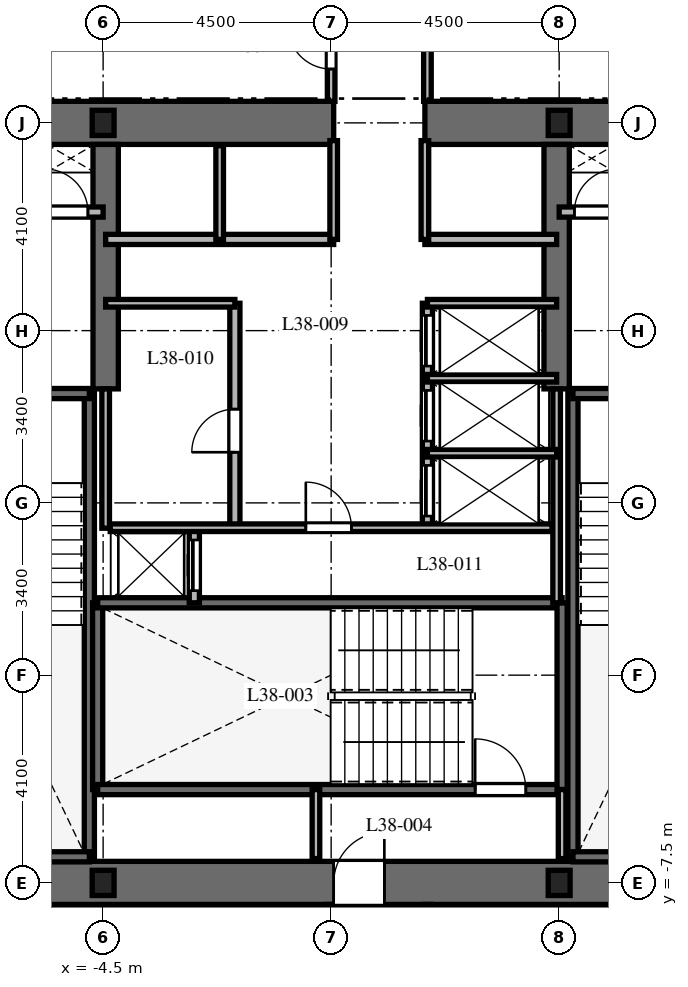
"""IFC4 building model, lengths in metres.
Left out: names, types, materials, properties, quantities, classifications, styles, units other than length and angle.
Written with IfcOpenShell. Run it as: python <this file> out.ifc"""

import sys

from ifc_helpers import new_model, si_unit, direction, frame, frame_2d, origin, origin_2d, place, context, subcontext, project, spatial, rectangle, i_section, extrude, element, fill, save


model = new_model("IFC4")
c1 = context("Model", 3, precision=1e-05, world=origin(), true_north=direction((0.0, 1.0)))
c2 = subcontext(c1, "Body", "Model", "MODEL_VIEW")
j1 = project(units=[si_unit("LENGTHUNIT", "METRE"), si_unit("PLANEANGLEUNIT", "RADIAN")], contexts=[c1])
p1 = place(None, origin())
s1 = spatial("IfcSite", under=j1, at=p1, CompositionType="ELEMENT")
p2 = place(p1, origin())
s2 = spatial("IfcBuilding", under=s1, at=p2, CompositionType="ELEMENT")
p3 = place(p2, frame((0.0, 0.0, 155.4)))
s3 = spatial("IfcBuildingStorey", under=s2, at=p3, CompositionType="ELEMENT", Elevation=155.4)
p4 = place(p3, frame((-9.425, -7.5, 0.0), z_axis=(0.0, 0.0, 1.0), x_axis=(1.0, 0.0, 0.0)))
e1 = element("IfcWall", 1, at=p4, inside=s3, PredefinedType="SHEAR", context=c2, shape_type="SweptSolid", body=[
    extrude(rectangle(XDim=18.85, YDim=0.85, at=frame_2d((9.425, 0.0))), origin(), (0.0, 0.0, 1.0), 3.7),
])
p5 = place(p4, frame((9.475, 0.0, 0.0)))
e2 = element("IfcOpeningElement", 2, at=p5, cuts=e1, PredefinedType="OPENING", context=c2, shape_type="SweptSolid", body=[
    extrude(rectangle(XDim=1.0, YDim=2.15, at=frame_2d((0.5, 1.075))), frame((0.0, 0.435, 0.0), z_axis=(0.0, -1.0, 0.0), x_axis=(1.0, 0.0, 0.0)), (0.0, 0.0, 1.0), 0.87),
])
p6 = place(p3, frame((-9.425, 7.5, 0.0), z_axis=(0.0, 0.0, 1.0), x_axis=(1.0, 0.0, 0.0)))
e3 = element("IfcWall", 3, at=p6, inside=s3, PredefinedType="SHEAR", context=c2, shape_type="SweptSolid", body=[
    extrude(rectangle(XDim=9.475, YDim=0.85, at=frame_2d((4.738, 0.0))), origin(), (0.0, 0.0, 1.0), 3.7),
])
p7 = place(p3, frame((1.85, 7.5, 0.0), z_axis=(0.0, 0.0, 1.0), x_axis=(1.0, 0.0, 0.0)))
e4 = element("IfcWall", 4, at=p7, inside=s3, PredefinedType="SHEAR", context=c2, shape_type="SweptSolid", body=[
    extrude(rectangle(XDim=7.575, YDim=0.85, at=frame_2d((3.788, 0.0))), origin(), (0.0, 0.0, 1.0), 3.7),
])
for number, where, z_axis, x_axis in (
    (5, (-4.45, 2.25, 0.0), (0.0, 0.0, 1.0), (0.0, 1.0, 0.0)),
    (6, (4.45, 2.25, 0.0), (0.0, 0.0, 1.0), (0.0, 1.0, 0.0)),
):
    element("IfcWall", number, at=place(p3, frame(where, z_axis=z_axis, x_axis=x_axis)), inside=s3, PredefinedType="SHEAR", context=c2, shape_type="SweptSolid", body=[
        extrude(rectangle(XDim=4.825, YDim=0.5, at=frame_2d((2.413, 0.0))), origin(), (0.0, 0.0, 1.0), 3.7),
    ])
p8 = place(p3, frame((-4.772, -6.985, 0.0), z_axis=(0.0, 0.0, 1.0), x_axis=(0.0, 1.0, 0.0)))
e7 = element("IfcWall", 7, at=p8, inside=s3, PredefinedType="SHEAR", context=c2, shape_type="SweptSolid", body=[
    extrude(rectangle(XDim=9.143, YDim=0.2, at=frame_2d((4.572, 0.0))), origin(), (0.0, 0.0, 1.0), 3.7),
])
p9 = place(p3, frame((-8.458, -6.985, 0.0), z_axis=(0.0, 0.0, 1.0), x_axis=(1.0, 0.0, 0.0)))
e8 = element("IfcWall", 8, at=p9, inside=s3, PredefinedType="SHEAR", context=c2, shape_type="SweptSolid", body=[
    extrude(rectangle(XDim=3.686, YDim=0.2, at=frame_2d((1.843, 0.0))), origin(), (0.0, 0.0, 1.0), 3.7),
])
p10 = place(p3, frame((-8.458, 2.158, 0.0), z_axis=(0.0, 0.0, 1.0), x_axis=(1.0, 0.0, 0.0)))
e9 = element("IfcWall", 9, at=p10, inside=s3, PredefinedType="SHEAR", context=c2, shape_type="SweptSolid", body=[
    extrude(rectangle(XDim=3.686, YDim=0.2, at=frame_2d((1.843, 0.0))), origin(), (0.0, 0.0, 1.0), 3.7),
])
p11 = place(p10, frame((1.3, 0.0, 0.0)))
e10 = element("IfcOpeningElement", 10, at=p11, cuts=e9, PredefinedType="OPENING", context=c2, shape_type="SweptSolid", body=[
    extrude(rectangle(XDim=1.0, YDim=2.15, at=frame_2d((0.5, 1.075))), frame((0.0, 0.11, 0.0), z_axis=(0.0, -1.0, 0.0), x_axis=(1.0, 0.0, 0.0)), (0.0, 0.0, 1.0), 0.22),
])
p12 = place(p3, frame((4.772, -6.985, 0.0), z_axis=(0.0, 0.0, 1.0), x_axis=(0.0, 1.0, 0.0)))
e11 = element("IfcWall", 11, at=p12, inside=s3, PredefinedType="SHEAR", context=c2, shape_type="SweptSolid", body=[
    extrude(rectangle(XDim=9.143, YDim=0.2, at=frame_2d((4.572, 0.0))), origin(), (0.0, 0.0, 1.0), 3.7),
])
p13 = place(p3, frame((4.772, -6.985, 0.0), z_axis=(0.0, 0.0, 1.0), x_axis=(1.0, 0.0, 0.0)))
e12 = element("IfcWall", 12, at=p13, inside=s3, PredefinedType="SHEAR", context=c2, shape_type="SweptSolid", body=[
    extrude(rectangle(XDim=3.686, YDim=0.2, at=frame_2d((1.843, 0.0))), origin(), (0.0, 0.0, 1.0), 3.7),
])
p14 = place(p3, frame((4.772, 2.158, 0.0), z_axis=(0.0, 0.0, 1.0), x_axis=(1.0, 0.0, 0.0)))
e13 = element("IfcWall", 13, at=p14, inside=s3, PredefinedType="SHEAR", context=c2, shape_type="SweptSolid", body=[
    extrude(rectangle(XDim=3.686, YDim=0.2, at=frame_2d((1.843, 0.0))), origin(), (0.0, 0.0, 1.0), 3.7),
])
p15 = place(p14, frame((1.35, 0.0, 0.0)))
e14 = element("IfcOpeningElement", 14, at=p15, cuts=e13, PredefinedType="OPENING", context=c2, shape_type="SweptSolid", body=[
    extrude(rectangle(XDim=1.0, YDim=2.15, at=frame_2d((0.5, 1.075))), frame((0.0, 0.11, 0.0), z_axis=(0.0, -1.0, 0.0), x_axis=(1.0, 0.0, 0.0)), (0.0, 0.0, 1.0), 0.22),
])
p16 = place(p3, frame((-4.608, -5.658, 0.0), z_axis=(0.0, 0.0, 1.0), x_axis=(0.0, 1.0, 0.0)))
e15 = element("IfcWall", 15, at=p16, inside=s3, PredefinedType="SHEAR", context=c2, shape_type="SweptSolid", body=[
    extrude(rectangle(XDim=3.686, YDim=0.2, at=frame_2d((1.843, 0.0))), origin(), (0.0, 0.0, 1.0), 3.7),
])
p17 = place(p3, frame((-4.608, -5.658, 0.0), z_axis=(0.0, 0.0, 1.0), x_axis=(1.0, 0.0, 0.0)))
e16 = element("IfcWall", 16, at=p17, inside=s3, PredefinedType="SHEAR", context=c2, shape_type="SweptSolid", body=[
    extrude(rectangle(XDim=9.166, YDim=0.2, at=frame_2d((4.583, 0.0))), origin(), (0.0, 0.0, 1.0), 3.7),
])
p18 = place(p17, frame((7.45, 0.0, 0.0)))
e17 = element("IfcOpeningElement", 17, at=p18, cuts=e16, PredefinedType="OPENING", context=c2, shape_type="SweptSolid", body=[
    extrude(rectangle(XDim=1.0, YDim=2.15, at=frame_2d((0.5, 1.075))), frame((0.0, 0.11, 0.0), z_axis=(0.0, -1.0, 0.0), x_axis=(1.0, 0.0, 0.0)), (0.0, 0.0, 1.0), 0.22),
])
p19 = place(p3, frame((-4.608, -1.972, 0.0), z_axis=(0.0, 0.0, 1.0), x_axis=(1.0, 0.0, 0.0)))
e18 = element("IfcWall", 18, at=p19, inside=s3, PredefinedType="SHEAR", context=c2, shape_type="SweptSolid", body=[
    extrude(rectangle(XDim=9.166, YDim=0.2, at=frame_2d((4.583, 0.0))), origin(), (0.0, 0.0, 1.0), 3.7),
])
p20 = place(p3, frame((4.558, -5.658, 0.0), z_axis=(0.0, 0.0, 1.0), x_axis=(0.0, 1.0, 0.0)))
e19 = element("IfcWall", 19, at=p20, inside=s3, PredefinedType="SHEAR", context=c2, shape_type="SweptSolid", body=[
    extrude(rectangle(XDim=3.686, YDim=0.2, at=frame_2d((1.843, 0.0))), origin(), (0.0, 0.0, 1.0), 3.7),
])
for number, where, z_axis, x_axis in (
    (20, (-4.5, -7.5, 0.0), (0.0, 0.0, 1.0), (1.0, 0.0, 0.0)),
    (21, (4.5, -7.5, 0.0), (0.0, 0.0, 1.0), (1.0, 0.0, 0.0)),
    (22, (4.5, 7.5, 0.0), (0.0, 0.0, 1.0), (1.0, 0.0, 0.0)),
    (23, (-4.5, 7.5, 0.0), (0.0, 0.0, 1.0), (1.0, 0.0, 0.0)),
):
    element("IfcColumn", number, at=place(p3, frame(where, z_axis=z_axis, x_axis=x_axis)), inside=s3, PredefinedType="COLUMN", context=c2, shape_type="SweptSolid", body=[
        extrude(i_section(OverallWidth=0.432, OverallDepth=0.498, WebThickness=0.056, FlangeThickness=0.089, at=origin_2d()), origin(), (0.0, 0.0, 1.0), 3.7),
    ])
for number, where, z_axis, x_axis in (
    (24, (-0.3, -7.02, 0.0), (0.0, 0.0, 1.0), (0.0, 1.0, 0.0)),
    (25, (4.558, -7.02, 0.0), (0.0, 0.0, 1.0), (0.0, 1.0, 0.0)),
):
    element("IfcWall", number, at=place(p3, frame(where, z_axis=z_axis, x_axis=x_axis)), inside=s3, PredefinedType="PARTITIONING", context=c2, shape_type="SweptSolid", body=[
        extrude(rectangle(XDim=1.362, YDim=0.15, at=frame_2d((0.681, 0.0))), origin(), (0.0, 0.0, 1.0), 3.4),
    ])
p21 = place(p3, frame((-8.55, 5.74, 0.0), z_axis=(0.0, 0.0, 1.0), x_axis=(1.0, 0.0, 0.0)))
e26 = element("IfcWall", 26, at=p21, inside=s3, PredefinedType="PARTITIONING", context=c2, shape_type="SweptSolid", body=[
    extrude(rectangle(XDim=4.05, YDim=0.2, at=frame_2d((2.025, 0.0))), origin(), (0.0, 0.0, 1.0), 3.4),
])
p22 = place(p21, frame((0.75, 0.0, 0.0)))
e27 = element("IfcOpeningElement", 27, at=p22, cuts=e26, PredefinedType="OPENING", context=c2, shape_type="SweptSolid", body=[
    extrude(rectangle(XDim=1.1, YDim=2.2, at=frame_2d((0.55, 1.1))), frame((0.0, 0.11, 0.0), z_axis=(0.0, -1.0, 0.0), x_axis=(1.0, 0.0, 0.0)), (0.0, 0.0, 1.0), 0.22),
])
p23 = place(p21, frame((2.9, 0.0, 0.0)))
e28 = element("IfcOpeningElement", 28, at=p23, cuts=e26, PredefinedType="OPENING", context=c2, shape_type="SweptSolid", body=[
    extrude(rectangle(XDim=0.85, YDim=2.03, at=frame_2d((0.425, 1.015))), frame((0.0, 0.11, 0.0), z_axis=(0.0, -1.0, 0.0), x_axis=(1.0, 0.0, 0.0)), (0.0, 0.0, 1.0), 0.22),
])
p24 = place(p3, frame((4.5, 5.74, 0.0), z_axis=(0.0, 0.0, 1.0), x_axis=(1.0, 0.0, 0.0)))
e29 = element("IfcWall", 29, at=p24, inside=s3, PredefinedType="PARTITIONING", context=c2, shape_type="SweptSolid", body=[
    extrude(rectangle(XDim=4.05, YDim=0.2, at=frame_2d((2.025, 0.0))), origin(), (0.0, 0.0, 1.0), 3.4),
])
p25 = place(p24, frame((0.3, 0.0, 0.0)))
e30 = element("IfcOpeningElement", 30, at=p25, cuts=e29, PredefinedType="OPENING", context=c2, shape_type="SweptSolid", body=[
    extrude(rectangle(XDim=0.85, YDim=2.03, at=frame_2d((0.425, 1.015))), frame((0.0, 0.11, 0.0), z_axis=(0.0, -1.0, 0.0), x_axis=(1.0, 0.0, 0.0)), (0.0, 0.0, 1.0), 0.22),
])
p26 = place(p24, frame((2.15, 0.0, 0.0)))
e31 = element("IfcOpeningElement", 31, at=p26, cuts=e29, PredefinedType="OPENING", context=c2, shape_type="SweptSolid", body=[
    extrude(rectangle(XDim=1.1, YDim=2.2, at=frame_2d((0.55, 1.1))), frame((0.0, 0.11, 0.0), z_axis=(0.0, -1.0, 0.0), x_axis=(1.0, 0.0, 0.0)), (0.0, 0.0, 1.0), 0.22),
])
p27 = place(p3, frame((-2.7, -1.972, 0.0), z_axis=(0.0, 0.0, 1.0), x_axis=(0.0, 1.0, 0.0)))
e32 = element("IfcWall", 32, at=p27, inside=s3, PredefinedType="PARTITIONING", context=c2, shape_type="SweptSolid", body=[
    extrude(rectangle(XDim=1.472, YDim=0.2, at=frame_2d((0.736, 0.0))), origin(), (0.0, 0.0, 1.0), 3.4),
])
p28 = place(p27, frame((0.24, 0.0, 0.0)))
e33 = element("IfcOpeningElement", 33, at=p28, cuts=e32, PredefinedType="OPENING", context=c2, shape_type="SweptSolid", body=[
    extrude(rectangle(XDim=1.0, YDim=2.2, at=frame_2d((0.5, 1.1))), frame((0.0, 0.11, 0.0), z_axis=(0.0, -1.0, 0.0), x_axis=(1.0, 0.0, 0.0)), (0.0, 0.0, 1.0), 0.22),
])
p29 = place(p3, frame((-4.45, 5.2, 0.0), z_axis=(0.0, 0.0, 1.0), x_axis=(1.0, 0.0, 0.0)))
e34 = element("IfcWall", 34, at=p29, inside=s3, PredefinedType="PARTITIONING", context=c2, shape_type="SweptSolid", body=[
    extrude(rectangle(XDim=4.5, YDim=0.2, at=frame_2d((2.25, 0.0))), origin(), (0.0, 0.0, 1.0), 3.4),
])
p30 = place(p3, frame((1.85, 5.2, 0.0), z_axis=(0.0, 0.0, 1.0), x_axis=(1.0, 0.0, 0.0)))
e35 = element("IfcWall", 35, at=p30, inside=s3, PredefinedType="PARTITIONING", context=c2, shape_type="SweptSolid", body=[
    extrude(rectangle(XDim=2.6, YDim=0.2, at=frame_2d((1.3, 0.0))), origin(), (0.0, 0.0, 1.0), 3.4),
])
p31 = place(p3, frame((-2.2, 5.2, 0.0), z_axis=(0.0, 0.0, 1.0), x_axis=(0.0, 1.0, 0.0)))
e36 = element("IfcWall", 36, at=p31, inside=s3, PredefinedType="PARTITIONING", context=c2, shape_type="SweptSolid", body=[
    extrude(rectangle(XDim=1.85, YDim=0.15, at=frame_2d((0.925, 0.0))), origin(), (0.0, 0.0, 1.0), 3.4),
])
for number, where, z_axis, x_axis in (
    (37, (0.05, 5.2, 0.0), (0.0, 0.0, 1.0), (0.0, 1.0, 0.0)),
    (38, (1.85, 5.2, 0.0), (0.0, 0.0, 1.0), (0.0, 1.0, 0.0)),
):
    element("IfcWall", number, at=place(p3, frame(where, z_axis=z_axis, x_axis=x_axis)), inside=s3, PredefinedType="PARTITIONING", context=c2, shape_type="SweptSolid", body=[
        extrude(rectangle(XDim=1.95, YDim=0.15, at=frame_2d((0.975, 0.0))), origin(), (0.0, 0.0, 1.0), 3.4),
    ])
p32 = place(p3, frame((-4.45, -0.5, 0.0), z_axis=(0.0, 0.0, 1.0), x_axis=(0.0, 1.0, 0.0)))
e39 = element("IfcWall", 39, at=p32, inside=s3, PredefinedType="PARTITIONING", context=c2, shape_type="SweptSolid", body=[
    extrude(rectangle(XDim=2.75, YDim=0.15, at=frame_2d((1.375, 0.0))), origin(), (0.0, 0.0, 1.0), 3.4),
])
p33 = place(p3, frame((4.45, -1.972, 0.0), z_axis=(0.0, 0.0, 1.0), x_axis=(0.0, 1.0, 0.0)))
e40 = element("IfcWall", 40, at=p33, inside=s3, PredefinedType="PARTITIONING", context=c2, shape_type="SweptSolid", body=[
    extrude(rectangle(XDim=4.222, YDim=0.15, at=frame_2d((2.111, 0.0))), origin(), (0.0, 0.0, 1.0), 3.4),
])
p34 = place(p3, frame((-1.9, -0.5, 0.0), z_axis=(0.0, 0.0, 1.0), x_axis=(0.0, 1.0, 0.0)))
e41 = element("IfcWall", 41, at=p34, inside=s3, PredefinedType="PARTITIONING", context=c2, shape_type="SweptSolid", body=[
    extrude(rectangle(XDim=4.44, YDim=0.2, at=frame_2d((2.22, 0.0))), origin(), (0.0, 0.0, 1.0), 3.4),
])
p35 = place(p34, frame((1.5, 0.0, 0.0)))
e42 = element("IfcOpeningElement", 42, at=p35, cuts=e41, PredefinedType="OPENING", context=c2, shape_type="SweptSolid", body=[
    extrude(rectangle(XDim=0.85, YDim=2.03, at=frame_2d((0.425, 1.015))), frame((0.0, 0.11, 0.0), z_axis=(0.0, -1.0, 0.0), x_axis=(1.0, 0.0, 0.0)), (0.0, 0.0, 1.0), 0.22),
])
p36 = place(p3, frame((-4.45, 3.94, 0.0), z_axis=(0.0, 0.0, 1.0), x_axis=(1.0, 0.0, 0.0)))
e43 = element("IfcWall", 43, at=p36, inside=s3, PredefinedType="PARTITIONING", context=c2, shape_type="SweptSolid", body=[
    extrude(rectangle(XDim=2.55, YDim=0.15, at=frame_2d((1.275, 0.0))), origin(), (0.0, 0.0, 1.0), 3.4),
])
p37 = place(p3, frame((1.9, -0.5, 0.0), z_axis=(0.0, 0.0, 1.0), x_axis=(0.0, 1.0, 0.0)))
e44 = element("IfcWall", 44, at=p37, inside=s3, PredefinedType="PARTITIONING", context=c2, shape_type="SweptSolid", body=[
    extrude(rectangle(XDim=4.44, YDim=0.2, at=frame_2d((2.22, 0.0))), origin(), (0.0, 0.0, 1.0), 3.4),
])
p38 = place(p37, frame((0.24, 0.0, 0.0)))
e45 = element("IfcOpeningElement", 45, at=p38, cuts=e44, PredefinedType="OPENING", context=c2, shape_type="SweptSolid", body=[
    extrude(rectangle(XDim=1.0, YDim=2.2, at=frame_2d((0.5, 1.1))), frame((0.0, 0.11, 0.0), z_axis=(0.0, -1.0, 0.0), x_axis=(1.0, 0.0, 0.0)), (0.0, 0.0, 1.0), 0.22),
])
p39 = place(p37, frame((1.72, 0.0, 0.0)))
e46 = element("IfcOpeningElement", 46, at=p39, cuts=e44, PredefinedType="OPENING", context=c2, shape_type="SweptSolid", body=[
    extrude(rectangle(XDim=1.0, YDim=2.2, at=frame_2d((0.5, 1.1))), frame((0.0, 0.11, 0.0), z_axis=(0.0, -1.0, 0.0), x_axis=(1.0, 0.0, 0.0)), (0.0, 0.0, 1.0), 0.22),
])
p40 = place(p37, frame((3.2, 0.0, 0.0)))
e47 = element("IfcOpeningElement", 47, at=p40, cuts=e44, PredefinedType="OPENING", context=c2, shape_type="SweptSolid", body=[
    extrude(rectangle(XDim=1.0, YDim=2.2, at=frame_2d((0.5, 1.1))), frame((0.0, 0.11, 0.0), z_axis=(0.0, -1.0, 0.0), x_axis=(1.0, 0.0, 0.0)), (0.0, 0.0, 1.0), 0.22),
])
for number, where, z_axis, x_axis in (
    (48, (1.9, 3.94, 0.0), (0.0, 0.0, 1.0), (1.0, 0.0, 0.0)),
    (49, (1.9, 0.98, 0.0), (0.0, 0.0, 1.0), (1.0, 0.0, 0.0)),
    (50, (1.9, 2.46, 0.0), (0.0, 0.0, 1.0), (1.0, 0.0, 0.0)),
):
    element("IfcWall", number, at=place(p3, frame(where, z_axis=z_axis, x_axis=x_axis)), inside=s3, PredefinedType="PARTITIONING", context=c2, shape_type="SweptSolid", body=[
        extrude(rectangle(XDim=2.55, YDim=0.15, at=frame_2d((1.275, 0.0))), origin(), (0.0, 0.0, 1.0), 3.4),
    ])
p41 = place(p3, frame((-4.36, -0.49, 0.0), z_axis=(0.0, 0.0, 1.0), x_axis=(1.0, 0.0, 0.0)))
e51 = element("IfcWall", 51, at=p41, inside=s3, PredefinedType="PARTITIONING", context=c2, shape_type="SweptSolid", body=[
    extrude(rectangle(XDim=8.72, YDim=0.15, at=frame_2d((4.36, 0.0))), origin(), (0.0, 0.0, 1.0), 3.4),
])
p42 = place(p41, frame((3.86, 0.0, 0.0)))
e52 = element("IfcOpeningElement", 52, at=p42, cuts=e51, PredefinedType="OPENING", context=c2, shape_type="SweptSolid", body=[
    extrude(rectangle(XDim=0.9, YDim=2.03, at=frame_2d((0.45, 1.015))), frame((0.0, 0.085, 0.0), z_axis=(0.0, -1.0, 0.0), x_axis=(1.0, 0.0, 0.0)), (0.0, 0.0, 1.0), 0.17),
])
p43 = place(p3, frame((1.9, 10.05, 0.0), z_axis=(0.0, 0.0, 1.0), x_axis=(0.0, -1.0, 0.0)))
e53 = element("IfcWall", 53, at=p43, inside=s3, PredefinedType="PARTITIONING", context=c2, shape_type="SweptSolid", body=[
    extrude(rectangle(XDim=2.125, YDim=0.15, at=frame_2d((1.062, 0.0))), origin(), (0.0, 0.0, 1.0), 3.4),
])
p44 = place(p3, frame((0.0, 7.925, 0.0), z_axis=(0.0, 0.0, 1.0), x_axis=(0.0, 1.0, 0.0)))
e54 = element("IfcWall", 54, at=p44, inside=s3, PredefinedType="PARTITIONING", context=c2, shape_type="SweptSolid", body=[
    extrude(rectangle(XDim=2.125, YDim=0.15, at=frame_2d((1.062, 0.0))), origin(), (0.0, 0.0, 1.0), 3.4),
])
p45 = place(p44, frame((0.638, 0.0, 0.0)))
e55 = element("IfcOpeningElement", 55, at=p45, cuts=e54, PredefinedType="OPENING", context=c2, shape_type="SweptSolid", body=[
    extrude(rectangle(XDim=0.85, YDim=2.03, at=frame_2d((0.425, 1.015))), frame((0.0, 0.085, 0.0), z_axis=(0.0, -1.0, 0.0), x_axis=(1.0, 0.0, 0.0)), (0.0, 0.0, 1.0), 0.17),
])
for number, where, z_axis, x_axis in (
    (56, (0.0, -10.05, 0.0), (0.0, 0.0, 1.0), (0.0, 1.0, 0.0)),
    (57, (1.9, -7.925, 0.0), (0.0, 0.0, 1.0), (0.0, -1.0, 0.0)),
):
    element("IfcWall", number, at=place(p3, frame(where, z_axis=z_axis, x_axis=x_axis)), inside=s3, PredefinedType="PARTITIONING", context=c2, shape_type="SweptSolid", body=[
        extrude(rectangle(XDim=2.125, YDim=0.15, at=frame_2d((1.062, 0.0))), origin(), (0.0, 0.0, 1.0), 3.4),
    ])
p46 = place(p18, origin())
e58 = element("IfcDoor", 58, at=p46, inside=s3, OperationType="SINGLE_SWING_LEFT", PredefinedType="DOOR", context=c2, shape_type="SweptSolid", body=[
    extrude(rectangle(XDim=1.0, YDim=2.15, at=frame_2d((0.5, 1.075))), frame((0.0, 0.025, 0.0), z_axis=(0.0, -1.0, 0.0), x_axis=(1.0, 0.0, 0.0)), (0.0, 0.0, 1.0), 0.05),
])
fill(e17, e58)
p47 = place(p5, origin())
e59 = element("IfcDoor", 59, at=p47, inside=s3, OperationType="SINGLE_SWING_RIGHT", PredefinedType="DOOR", context=c2, shape_type="SweptSolid", body=[
    extrude(rectangle(XDim=1.0, YDim=2.15, at=frame_2d((0.5, 1.075))), frame((0.0, 0.025, 0.0), z_axis=(0.0, -1.0, 0.0), x_axis=(1.0, 0.0, 0.0)), (0.0, 0.0, 1.0), 0.05),
])
fill(e2, e59)
p48 = place(p23, origin())
e60 = element("IfcDoor", 60, at=p48, inside=s3, OperationType="SINGLE_SWING_LEFT", PredefinedType="DOOR", context=c2, shape_type="SweptSolid", body=[
    extrude(rectangle(XDim=0.85, YDim=2.03, at=frame_2d((0.425, 1.015))), frame((0.0, 0.025, 0.0), z_axis=(0.0, -1.0, 0.0), x_axis=(1.0, 0.0, 0.0)), (0.0, 0.0, 1.0), 0.05),
])
fill(e28, e60)
p49 = place(p25, origin())
e61 = element("IfcDoor", 61, at=p49, inside=s3, OperationType="SINGLE_SWING_RIGHT", PredefinedType="DOOR", context=c2, shape_type="SweptSolid", body=[
    extrude(rectangle(XDim=0.85, YDim=2.03, at=frame_2d((0.425, 1.015))), frame((0.0, 0.025, 0.0), z_axis=(0.0, -1.0, 0.0), x_axis=(1.0, 0.0, 0.0)), (0.0, 0.0, 1.0), 0.05),
])
fill(e30, e61)
p50 = place(p28, origin())
e62 = element("IfcDoor", 62, at=p50, inside=s3, OperationType="SLIDING_TO_LEFT", PredefinedType="DOOR", context=c2, shape_type="SweptSolid", body=[
    extrude(rectangle(XDim=1.0, YDim=2.2, at=frame_2d((0.5, 1.1))), frame((0.0, 0.025, 0.0), z_axis=(0.0, -1.0, 0.0), x_axis=(1.0, 0.0, 0.0)), (0.0, 0.0, 1.0), 0.05),
])
fill(e33, e62)
p51 = place(p35, origin())
e63 = element("IfcDoor", 63, at=p51, inside=s3, OperationType="SINGLE_SWING_LEFT", PredefinedType="DOOR", context=c2, shape_type="SweptSolid", body=[
    extrude(rectangle(XDim=0.85, YDim=2.03, at=frame_2d((0.425, 1.015))), frame((0.0, 0.025, 0.0), z_axis=(0.0, -1.0, 0.0), x_axis=(1.0, 0.0, 0.0)), (0.0, 0.0, 1.0), 0.05),
])
fill(e42, e63)
p52 = place(p38, origin())
e64 = element("IfcDoor", 64, at=p52, inside=s3, OperationType="SLIDING_TO_RIGHT", PredefinedType="DOOR", context=c2, shape_type="SweptSolid", body=[
    extrude(rectangle(XDim=1.0, YDim=2.2, at=frame_2d((0.5, 1.1))), frame((0.0, 0.025, 0.0), z_axis=(0.0, -1.0, 0.0), x_axis=(1.0, 0.0, 0.0)), (0.0, 0.0, 1.0), 0.05),
])
fill(e45, e64)
p53 = place(p39, origin())
e65 = element("IfcDoor", 65, at=p53, inside=s3, OperationType="SLIDING_TO_RIGHT", PredefinedType="DOOR", context=c2, shape_type="SweptSolid", body=[
    extrude(rectangle(XDim=1.0, YDim=2.2, at=frame_2d((0.5, 1.1))), frame((0.0, 0.025, 0.0), z_axis=(0.0, -1.0, 0.0), x_axis=(1.0, 0.0, 0.0)), (0.0, 0.0, 1.0), 0.05),
])
fill(e46, e65)
p54 = place(p40, origin())
e66 = element("IfcDoor", 66, at=p54, inside=s3, OperationType="SLIDING_TO_RIGHT", PredefinedType="DOOR", context=c2, shape_type="SweptSolid", body=[
    extrude(rectangle(XDim=1.0, YDim=2.2, at=frame_2d((0.5, 1.1))), frame((0.0, 0.025, 0.0), z_axis=(0.0, -1.0, 0.0), x_axis=(1.0, 0.0, 0.0)), (0.0, 0.0, 1.0), 0.05),
])
fill(e47, e66)
p55 = place(p42, origin())
e67 = element("IfcDoor", 67, at=p55, inside=s3, OperationType="SINGLE_SWING_LEFT", PredefinedType="DOOR", context=c2, shape_type="SweptSolid", body=[
    extrude(rectangle(XDim=0.9, YDim=2.03, at=frame_2d((0.45, 1.015))), frame((0.0, 0.025, 0.0), z_axis=(0.0, -1.0, 0.0), x_axis=(1.0, 0.0, 0.0)), (0.0, 0.0, 1.0), 0.05),
])
fill(e52, e67)
p56 = place(p45, origin())
e68 = element("IfcDoor", 68, at=p56, inside=s3, OperationType="SINGLE_SWING_RIGHT", PredefinedType="DOOR", context=c2, shape_type="SweptSolid", body=[
    extrude(rectangle(XDim=0.85, YDim=2.03, at=frame_2d((0.425, 1.015))), frame((0.0, 0.025, 0.0), z_axis=(0.0, -1.0, 0.0), x_axis=(1.0, 0.0, 0.0)), (0.0, 0.0, 1.0), 0.05),
])
fill(e55, e68)
save(model, sys.argv[1])
